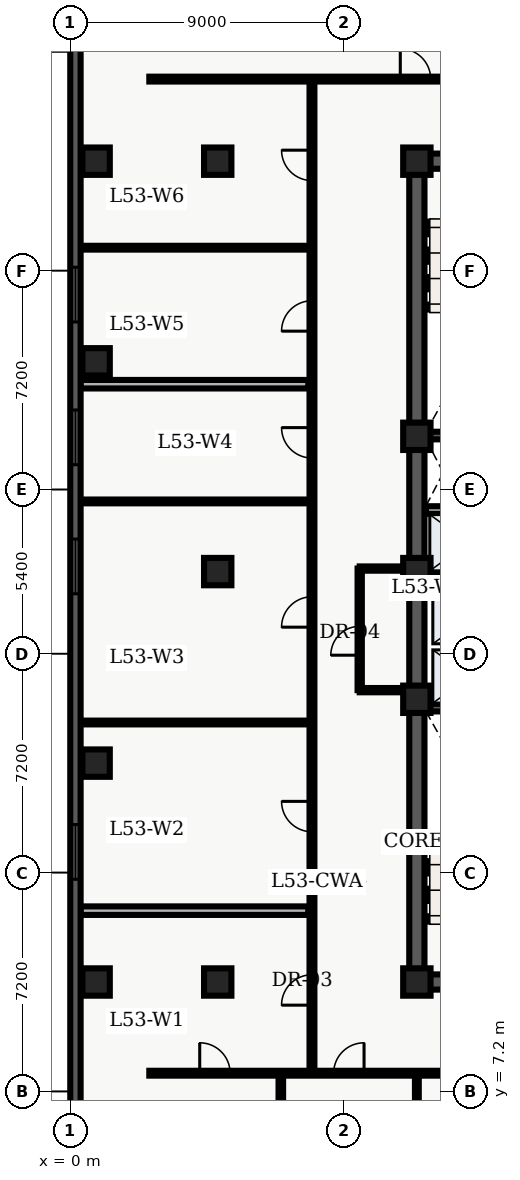
"""IFC4 building model, lengths in metres.
Left out: names, types, materials, properties, quantities, classifications, styles, units other than length and angle.
Written with IfcOpenShell. Run it as: python <this file> out.ifc"""

import sys

from ifc_helpers import new_model, entity, si_unit, converted_unit, direction, frame, origin_with_axes, origin_2d_with_axis, place, context, subcontext, project, spatial, polyline, rectangle, outline, extrude, element, fill, save


model = new_model("IFC4")
c1 = context("Model", 3, precision=1e-05, world=origin_with_axes(), true_north=direction((0.0, 1.0)))
c2 = subcontext(c1, "Body", "Model", "MODEL_VIEW")
j1 = project(units=[si_unit("LENGTHUNIT", "METRE"), converted_unit("PLANEANGLEUNIT", "DEGREE", entity("IfcPlaneAngleMeasure", 0.017), si_unit("PLANEANGLEUNIT", "RADIAN"), dimensions=[0, 0, 0, 0, 0, 0, 0])], contexts=[c1])
p1 = place(None, origin_with_axes())
s1 = spatial("IfcSite", under=j1, at=p1, CompositionType="ELEMENT")
p2 = place(p1, origin_with_axes())
s2 = spatial("IfcBuilding", under=s1, at=p2, CompositionType="ELEMENT")
p3 = place(p2, frame((0.0, 0.0, 216.0), z_axis=(0.0, 0.0, 1.0), x_axis=(1.0, 0.0, 0.0)))
s3 = spatial("IfcBuildingStorey", under=s2, at=p3, CompositionType="ELEMENT", Elevation=216.0)
p4 = place(p3, frame((11.4, 10.8, 0.0), z_axis=(0.0, 0.0, 1.0), x_axis=(0.0, 1.0, 0.0)))
e1 = element("IfcWall", 1, at=p4, inside=s3, PredefinedType="SHEAR", context=c2, shape_type="SweptSolid", body=[
    extrude(outline(polyline([(0.0, -0.25), (27.0, -0.25), (27.0, 0.25), (0.0, 0.25), (0.0, -0.25)])), origin_with_axes(), (0.0, 0.0, 1.0), 3.6),
])
p5 = place(p3, frame((11.4, 10.8, 0.0), z_axis=(0.0, 0.0, 1.0), x_axis=(1.0, 0.0, 0.0)))
e2 = element("IfcWall", 2, at=p5, inside=s3, PredefinedType="SHEAR", context=c2, shape_type="SweptSolid", body=[
    extrude(outline(polyline([(0.0, -0.25), (7.2, -0.25), (7.2, 0.25), (0.0, 0.25), (0.0, -0.25)])), origin_with_axes(), (0.0, 0.0, 1.0), 3.6),
])
p6 = place(p5, frame((2.625, 0.0, 0.0), z_axis=(0.0, 0.0, 1.0), x_axis=(1.0, 0.0, 0.0)))
e3 = element("IfcOpeningElement", 3, at=p6, cuts=e2, PredefinedType="OPENING", context=c2, shape_type="SweptSolid", body=[
    extrude(rectangle(XDim=1.05, YDim=0.52, at=origin_2d_with_axis()), origin_with_axes(), (0.0, 0.0, 1.0), 2.15),
])
p7 = place(p3, frame((11.4, 37.8, 0.0), z_axis=(0.0, 0.0, 1.0), x_axis=(1.0, 0.0, 0.0)))
e4 = element("IfcWall", 4, at=p7, inside=s3, PredefinedType="SHEAR", context=c2, shape_type="SweptSolid", body=[
    extrude(outline(polyline([(0.0, -0.25), (7.2, -0.25), (7.2, 0.25), (0.0, 0.25), (0.0, -0.25)])), origin_with_axes(), (0.0, 0.0, 1.0), 3.6),
])
p8 = place(p7, frame((2.625, 0.0, 0.0), z_axis=(0.0, 0.0, 1.0), x_axis=(1.0, 0.0, 0.0)))
e5 = element("IfcOpeningElement", 5, at=p8, cuts=e4, PredefinedType="OPENING", context=c2, shape_type="SweptSolid", body=[
    extrude(rectangle(XDim=1.05, YDim=0.52, at=origin_2d_with_axis()), origin_with_axes(), (0.0, 0.0, 1.0), 2.15),
])
for number, where, z_axis, x_axis in (
    (6, (11.65, 19.825, 0.0), (0.0, 0.0, 1.0), (1.0, 0.0, 0.0)),
    (7, (11.65, 28.775, 0.0), (0.0, 0.0, 1.0), (1.0, 0.0, 0.0)),
):
    element("IfcWall", number, at=place(p3, frame(where, z_axis=z_axis, x_axis=x_axis)), inside=s3, PredefinedType="SHEAR", context=c2, shape_type="SweptSolid", body=[
        extrude(outline(polyline([(0.0, -0.125), (6.7, -0.125), (6.7, 0.125), (0.0, 0.125), (0.0, -0.125)])), origin_with_axes(), (0.0, 0.0, 1.0), 3.6),
    ])
p9 = place(p3, frame((11.7, 24.1, 0.0), z_axis=(0.0, 0.0, 1.0), x_axis=(1.0, 0.0, 0.0)))
e8 = element("IfcWall", 8, at=p9, inside=s3, PredefinedType="SOLIDWALL", context=c2, shape_type="SweptSolid", body=[
    extrude(outline(polyline([(0.0, -0.125), (6.6, -0.125), (6.6, 0.125), (0.0, 0.125), (0.0, -0.125)])), origin_with_axes(), (0.0, 0.0, 1.0), 2.64),
])
p10 = place(p9, frame((3.75, 0.0, 0.0), z_axis=(0.0, 0.0, 1.0), x_axis=(1.0, 0.0, 0.0)))
e9 = element("IfcOpeningElement", 9, at=p10, cuts=e8, PredefinedType="OPENING", context=c2, shape_type="SweptSolid", body=[
    extrude(rectangle(XDim=0.9, YDim=0.27, at=origin_2d_with_axis()), origin_with_axes(), (0.0, 0.0, 1.0), 2.15),
])
p11 = place(p3, frame((11.7, 26.325, 0.0), z_axis=(0.0, 0.0, 1.0), x_axis=(1.0, 0.0, 0.0)))
e10 = element("IfcWall", 10, at=p11, inside=s3, PredefinedType="SOLIDWALL", context=c2, shape_type="SweptSolid", body=[
    extrude(outline(polyline([(0.0, -0.125), (6.6, -0.125), (6.6, 0.125), (0.0, 0.125), (0.0, -0.125)])), origin_with_axes(), (0.0, 0.0, 1.0), 2.64),
])
p12 = place(p11, frame((3.5, 0.0, 0.0), z_axis=(0.0, 0.0, 1.0), x_axis=(1.0, 0.0, 0.0)))
e11 = element("IfcOpeningElement", 11, at=p12, cuts=e10, PredefinedType="OPENING", context=c2, shape_type="SweptSolid", body=[
    extrude(rectangle(XDim=0.9, YDim=0.27, at=origin_2d_with_axis()), origin_with_axes(), (0.0, 0.0, 1.0), 2.15),
])
for number, where, z_axis, x_axis in (
    (12, (11.4, 10.8, 0.0), (0.0, 0.0, 1.0), (1.0, 0.0, 0.0)),
    (13, (11.4, 20.1, 0.0), (0.0, 0.0, 1.0), (1.0, 0.0, 0.0)),
    (14, (11.4, 24.3, 0.0), (0.0, 0.0, 1.0), (1.0, 0.0, 0.0)),
    (15, (11.4, 28.75, 0.0), (0.0, 0.0, 1.0), (1.0, 0.0, 0.0)),
    (16, (11.4, 37.8, 0.0), (0.0, 0.0, 1.0), (1.0, 0.0, 0.0)),
    (17, (4.85, 10.8, 0.0), (0.0, 0.0, 1.0), (1.0, 0.0, 0.0)),
    (18, (4.85, 24.3, 0.0), (0.0, 0.0, 1.0), (1.0, 0.0, 0.0)),
    (19, (4.85, 37.8, 0.0), (0.0, 0.0, 1.0), (1.0, 0.0, 0.0)),
    (20, (0.85, 10.8, 0.0), (0.0, 0.0, 1.0), (1.0, 0.0, 0.0)),
    (21, (0.85, 18.0, 0.0), (0.0, 0.0, 1.0), (1.0, 0.0, 0.0)),
    (22, (0.85, 31.2, 0.0), (0.0, 0.0, 1.0), (1.0, 0.0, 0.0)),
    (23, (0.85, 37.8, 0.0), (0.0, 0.0, 1.0), (1.0, 0.0, 0.0)),
):
    element("IfcColumn", number, at=place(p3, frame(where, z_axis=z_axis, x_axis=x_axis)), inside=s3, PredefinedType="COLUMN", context=c2, shape_type="SweptSolid", body=[
        extrude(rectangle(XDim=0.9, YDim=0.9, at=origin_2d_with_axis()), origin_with_axes(), (0.0, 0.0, 1.0), 3.9),
    ])
p13 = place(p3, frame((9.52, 20.4, 0.0), z_axis=(0.0, 0.0, 1.0), x_axis=(0.0, 1.0, 0.0)))
e24 = element("IfcWall", 24, at=p13, inside=s3, PredefinedType="PARTITIONING", context=c2, shape_type="SweptSolid", body=[
    extrude(outline(polyline([(0.0, -0.07), (4.0, -0.07), (4.0, 0.07), (0.0, 0.07), (0.0, -0.07)])), origin_with_axes(), (0.0, 0.0, 1.0), 2.64),
])
p14 = place(p13, frame((1.625, 0.0, 0.0), z_axis=(0.0, 0.0, 1.0), x_axis=(1.0, 0.0, 0.0)))
e25 = element("IfcOpeningElement", 25, at=p14, cuts=e24, PredefinedType="OPENING", context=c2, shape_type="SweptSolid", body=[
    extrude(rectangle(XDim=0.95, YDim=0.16, at=origin_2d_with_axis()), origin_with_axes(), (0.0, 0.0, 1.0), 2.15),
])
for number, where, z_axis, x_axis in (
    (26, (9.52, 20.4, 0.0), (0.0, 0.0, 1.0), (1.0, 0.0, 0.0)),
    (27, (9.52, 24.4, 0.0), (0.0, 0.0, 1.0), (1.0, 0.0, 0.0)),
):
    element("IfcWall", number, at=place(p3, frame(where, z_axis=z_axis, x_axis=x_axis)), inside=s3, PredefinedType="PARTITIONING", context=c2, shape_type="SweptSolid", body=[
        extrude(outline(polyline([(0.0, -0.07), (1.58, -0.07), (1.58, 0.07), (0.0, 0.07), (0.0, -0.07)])), origin_with_axes(), (0.0, 0.0, 1.0), 2.64),
    ])
p15 = place(p3, frame((2.6, 7.8, 0.0), z_axis=(0.0, 0.0, 1.0), x_axis=(1.0, 0.0, 0.0)))
e28 = element("IfcWall", 28, at=p15, inside=s3, PredefinedType="PARTITIONING", context=c2, shape_type="SweptSolid", body=[
    extrude(outline(polyline([(0.0, -0.08), (18.55, -0.08), (18.55, 0.08), (0.0, 0.08), (0.0, -0.08)])), origin_with_axes(), (0.0, 0.0, 1.0), 2.64),
])
p16 = place(p15, frame((2.158, 0.0, 0.0), z_axis=(0.0, 0.0, 1.0), x_axis=(1.0, 0.0, 0.0)))
e29 = element("IfcOpeningElement", 29, at=p16, cuts=e28, PredefinedType="OPENING", context=c2, shape_type="SweptSolid", body=[
    extrude(rectangle(XDim=1.0, YDim=0.18, at=origin_2d_with_axis()), origin_with_axes(), (0.0, 0.0, 1.0), 2.15),
])
p17 = place(p15, frame((6.563, 0.0, 0.0), z_axis=(0.0, 0.0, 1.0), x_axis=(1.0, 0.0, 0.0)))
e30 = element("IfcOpeningElement", 30, at=p17, cuts=e28, PredefinedType="OPENING", context=c2, shape_type="SweptSolid", body=[
    extrude(rectangle(XDim=1.0, YDim=0.18, at=origin_2d_with_axis()), origin_with_axes(), (0.0, 0.0, 1.0), 2.15),
])
p18 = place(p15, frame((11.931, 0.0, 0.0), z_axis=(0.0, 0.0, 1.0), x_axis=(1.0, 0.0, 0.0)))
e31 = element("IfcOpeningElement", 31, at=p18, cuts=e28, PredefinedType="OPENING", context=c2, shape_type="SweptSolid", body=[
    extrude(rectangle(XDim=1.0, YDim=0.18, at=origin_2d_with_axis()), origin_with_axes(), (0.0, 0.0, 1.0), 2.15),
])
p19 = place(p15, frame((16.501, 0.0, 0.0), z_axis=(0.0, 0.0, 1.0), x_axis=(1.0, 0.0, 0.0)))
e32 = element("IfcOpeningElement", 32, at=p19, cuts=e28, PredefinedType="OPENING", context=c2, shape_type="SweptSolid", body=[
    extrude(rectangle(XDim=1.0, YDim=0.18, at=origin_2d_with_axis()), origin_with_axes(), (0.0, 0.0, 1.0), 2.15),
])
p20 = place(p3, frame((2.6, 40.5, 0.0), z_axis=(0.0, 0.0, 1.0), x_axis=(1.0, 0.0, 0.0)))
e33 = element("IfcWall", 33, at=p20, inside=s3, PredefinedType="PARTITIONING", context=c2, shape_type="SweptSolid", body=[
    extrude(outline(polyline([(0.0, -0.08), (29.465, -0.08), (29.465, 0.08), (0.0, 0.08), (0.0, -0.08)])), origin_with_axes(), (0.0, 0.0, 1.0), 2.64),
])
p21 = place(p20, frame((8.755, 0.0, 0.0), z_axis=(0.0, 0.0, 1.0), x_axis=(1.0, 0.0, 0.0)))
e34 = element("IfcOpeningElement", 34, at=p21, cuts=e33, PredefinedType="OPENING", context=c2, shape_type="SweptSolid", body=[
    extrude(rectangle(XDim=1.0, YDim=0.18, at=origin_2d_with_axis()), origin_with_axes(), (0.0, 0.0, 1.0), 2.15),
])
p22 = place(p3, frame((7.95, 7.8, 0.0), z_axis=(0.0, 0.0, 1.0), x_axis=(0.0, 1.0, 0.0)))
e35 = element("IfcWall", 35, at=p22, inside=s3, PredefinedType="PARTITIONING", context=c2, shape_type="SweptSolid", body=[
    extrude(outline(polyline([(0.0, -0.08), (32.7, -0.08), (32.7, 0.08), (0.0, 0.08), (0.0, -0.08)])), origin_with_axes(), (0.0, 0.0, 1.0), 2.64),
])
p23 = place(p22, frame((2.739, 0.0, 0.0), z_axis=(0.0, 0.0, 1.0), x_axis=(1.0, 0.0, 0.0)))
e36 = element("IfcOpeningElement", 36, at=p23, cuts=e35, PredefinedType="OPENING", context=c2, shape_type="SweptSolid", body=[
    extrude(rectangle(XDim=1.0, YDim=0.18, at=origin_2d_with_axis()), origin_with_axes(), (0.0, 0.0, 1.0), 2.15),
])
p24 = place(p22, frame((8.441, 0.0, 0.0), z_axis=(0.0, 0.0, 1.0), x_axis=(1.0, 0.0, 0.0)))
e37 = element("IfcOpeningElement", 37, at=p24, cuts=e35, PredefinedType="OPENING", context=c2, shape_type="SweptSolid", body=[
    extrude(rectangle(XDim=1.0, YDim=0.18, at=origin_2d_with_axis()), origin_with_axes(), (0.0, 0.0, 1.0), 2.15),
])
p25 = place(p22, frame((15.172, 0.0, 0.0), z_axis=(0.0, 0.0, 1.0), x_axis=(1.0, 0.0, 0.0)))
e38 = element("IfcOpeningElement", 38, at=p25, cuts=e35, PredefinedType="OPENING", context=c2, shape_type="SweptSolid", body=[
    extrude(rectangle(XDim=1.0, YDim=0.18, at=origin_2d_with_axis()), origin_with_axes(), (0.0, 0.0, 1.0), 2.15),
])
p26 = place(p22, frame((20.736, 0.0, 0.0), z_axis=(0.0, 0.0, 1.0), x_axis=(1.0, 0.0, 0.0)))
e39 = element("IfcOpeningElement", 39, at=p26, cuts=e35, PredefinedType="OPENING", context=c2, shape_type="SweptSolid", body=[
    extrude(rectangle(XDim=1.0, YDim=0.18, at=origin_2d_with_axis()), origin_with_axes(), (0.0, 0.0, 1.0), 2.15),
])
p27 = place(p22, frame((24.909, 0.0, 0.0), z_axis=(0.0, 0.0, 1.0), x_axis=(1.0, 0.0, 0.0)))
e40 = element("IfcOpeningElement", 40, at=p27, cuts=e35, PredefinedType="OPENING", context=c2, shape_type="SweptSolid", body=[
    extrude(rectangle(XDim=1.0, YDim=0.18, at=origin_2d_with_axis()), origin_with_axes(), (0.0, 0.0, 1.0), 2.15),
])
p28 = place(p22, frame((29.862, 0.0, 0.0), z_axis=(0.0, 0.0, 1.0), x_axis=(1.0, 0.0, 0.0)))
e41 = element("IfcOpeningElement", 41, at=p28, cuts=e35, PredefinedType="OPENING", context=c2, shape_type="SweptSolid", body=[
    extrude(rectangle(XDim=1.0, YDim=0.18, at=origin_2d_with_axis()), origin_with_axes(), (0.0, 0.0, 1.0), 2.15),
])
p29 = place(p3, frame((0.335, 13.147, 0.0), z_axis=(0.0, 0.0, 1.0), x_axis=(1.0, 0.0, 0.0)))
e42 = element("IfcWall", 42, at=p29, inside=s3, PredefinedType="PARTITIONING", context=c2, shape_type="SweptSolid", body=[
    extrude(outline(polyline([(0.0, -0.14), (7.495, -0.14), (7.495, 0.14), (0.0, 0.14), (0.0, -0.14)])), origin_with_axes(), (0.0, 0.0, 1.0), 2.64),
])
for number, where, z_axis, x_axis in (
    (43, (0.335, 19.336, 0.0), (0.0, 0.0, 1.0), (1.0, 0.0, 0.0)),
    (44, (0.335, 26.608, 0.0), (0.0, 0.0, 1.0), (1.0, 0.0, 0.0)),
):
    element("IfcWall", number, at=place(p3, frame(where, z_axis=z_axis, x_axis=x_axis)), inside=s3, PredefinedType="PARTITIONING", context=c2, shape_type="SweptSolid", body=[
        extrude(outline(polyline([(0.0, -0.062), (7.495, -0.062), (7.495, 0.062), (0.0, 0.062), (0.0, -0.062)])), origin_with_axes(), (0.0, 0.0, 1.0), 2.64),
    ])
p30 = place(p3, frame((0.335, 30.464, 0.0), z_axis=(0.0, 0.0, 1.0), x_axis=(1.0, 0.0, 0.0)))
e45 = element("IfcWall", 45, at=p30, inside=s3, PredefinedType="PARTITIONING", context=c2, shape_type="SweptSolid", body=[
    extrude(outline(polyline([(0.0, -0.14), (7.495, -0.14), (7.495, 0.14), (0.0, 0.14), (0.0, -0.14)])), origin_with_axes(), (0.0, 0.0, 1.0), 2.64),
])
p31 = place(p3, frame((0.335, 34.954, 0.0), z_axis=(0.0, 0.0, 1.0), x_axis=(1.0, 0.0, 0.0)))
e46 = element("IfcWall", 46, at=p31, inside=s3, PredefinedType="PARTITIONING", context=c2, shape_type="SweptSolid", body=[
    extrude(outline(polyline([(0.0, -0.062), (7.495, -0.062), (7.495, 0.062), (0.0, 0.062), (0.0, -0.062)])), origin_with_axes(), (0.0, 0.0, 1.0), 2.64),
])
p32 = place(p3, frame((6.926, 0.335, 0.0), z_axis=(0.0, 0.0, 1.0), x_axis=(0.0, 1.0, 0.0)))
e47 = element("IfcWall", 47, at=p32, inside=s3, PredefinedType="PARTITIONING", context=c2, shape_type="SweptSolid", body=[
    extrude(outline(polyline([(0.0, -0.075), (7.365, -0.075), (7.365, 0.075), (0.0, 0.075), (0.0, -0.075)])), origin_with_axes(), (0.0, 0.0, 1.0), 2.64),
])
p33 = place(p3, frame((11.4, 0.335, 0.0), z_axis=(0.0, 0.0, 1.0), x_axis=(0.0, 1.0, 0.0)))
e48 = element("IfcWall", 48, at=p33, inside=s3, PredefinedType="PARTITIONING", context=c2, shape_type="SweptSolid", body=[
    extrude(outline(polyline([(0.0, -0.062), (7.365, -0.062), (7.365, 0.062), (0.0, 0.062), (0.0, -0.062)])), origin_with_axes(), (0.0, 0.0, 1.0), 2.64),
])
p34 = place(p3, frame((0.17, 2.74, 0.0), z_axis=(0.0, 0.0, 1.0), x_axis=(0.0, 1.0, 0.0)))
e49 = element("IfcWall", 49, at=p34, inside=s3, PredefinedType="SOLIDWALL", context=c2, shape_type="SweptSolid", body=[
    extrude(outline(polyline([(0.0, -0.17), (43.46, -0.17), (43.46, 0.17), (0.0, 0.17), (0.0, -0.17)])), origin_with_axes(), (0.0, 0.0, 1.0), 3.6),
])
p35 = place(p34, frame((2.948, 0.0, 0.45), z_axis=(0.0, 0.0, 1.0), x_axis=(1.0, 0.0, 0.0)))
e50 = element("IfcOpeningElement", 50, at=p35, cuts=e49, PredefinedType="OPENING", context=c2, shape_type="SweptSolid", body=[
    extrude(rectangle(XDim=1.8, YDim=0.36, at=origin_2d_with_axis()), origin_with_axes(), (0.0, 0.0, 1.0), 2.1),
])
p36 = place(p34, frame((12.339, 0.0, 0.45), z_axis=(0.0, 0.0, 1.0), x_axis=(1.0, 0.0, 0.0)))
e51 = element("IfcOpeningElement", 51, at=p36, cuts=e49, PredefinedType="OPENING", context=c2, shape_type="SweptSolid", body=[
    extrude(rectangle(XDim=1.8, YDim=0.36, at=origin_2d_with_axis()), origin_with_axes(), (0.0, 0.0, 1.0), 2.1),
])
p37 = place(p34, frame((21.73, 0.0, 0.45), z_axis=(0.0, 0.0, 1.0), x_axis=(1.0, 0.0, 0.0)))
e52 = element("IfcOpeningElement", 52, at=p37, cuts=e49, PredefinedType="OPENING", context=c2, shape_type="SweptSolid", body=[
    extrude(rectangle(XDim=1.8, YDim=0.36, at=origin_2d_with_axis()), origin_with_axes(), (0.0, 0.0, 1.0), 2.1),
])
p38 = place(p34, frame((25.976, 0.0, 0.45), z_axis=(0.0, 0.0, 1.0), x_axis=(1.0, 0.0, 0.0)))
e53 = element("IfcOpeningElement", 53, at=p38, cuts=e49, PredefinedType="OPENING", context=c2, shape_type="SweptSolid", body=[
    extrude(rectangle(XDim=1.8, YDim=0.36, at=origin_2d_with_axis()), origin_with_axes(), (0.0, 0.0, 1.0), 2.1),
])
p39 = place(p34, frame((30.671, 0.0, 0.45), z_axis=(0.0, 0.0, 1.0), x_axis=(1.0, 0.0, 0.0)))
e54 = element("IfcOpeningElement", 54, at=p39, cuts=e49, PredefinedType="OPENING", context=c2, shape_type="SweptSolid", body=[
    extrude(rectangle(XDim=1.8, YDim=0.36, at=origin_2d_with_axis()), origin_with_axes(), (0.0, 0.0, 1.0), 2.1),
])
p40 = place(p34, frame((40.062, 0.0, 0.45), z_axis=(0.0, 0.0, 1.0), x_axis=(1.0, 0.0, 0.0)))
e55 = element("IfcOpeningElement", 55, at=p40, cuts=e49, PredefinedType="OPENING", context=c2, shape_type="SweptSolid", body=[
    extrude(rectangle(XDim=1.8, YDim=0.36, at=origin_2d_with_axis()), origin_with_axes(), (0.0, 0.0, 1.0), 2.1),
])
p41 = place(p13, frame((1.625, 0.0, 0.0), z_axis=(0.0, 0.0, 1.0), x_axis=(1.0, 0.0, 0.0)))
e56 = element("IfcDoor", 56, at=p41, inside=s3, OperationType="SINGLE_SWING_LEFT", PredefinedType="DOOR", context=c2, shape_type="SweptSolid", body=[
    extrude(rectangle(XDim=0.95, YDim=0.084, at=origin_2d_with_axis()), origin_with_axes(), (0.0, 0.0, 1.0), 2.15),
])
fill(e25, e56)
p42 = place(p22, frame((2.739, 0.0, 0.0), z_axis=(0.0, 0.0, 1.0), x_axis=(1.0, 0.0, 0.0)))
e57 = element("IfcDoor", 57, at=p42, inside=s3, OperationType="SINGLE_SWING_LEFT", PredefinedType="DOOR", context=c2, shape_type="SweptSolid", body=[
    extrude(rectangle(XDim=1.0, YDim=0.09, at=origin_2d_with_axis()), origin_with_axes(), (0.0, 0.0, 1.0), 2.15),
])
fill(e36, e57)
p43 = place(p22, frame((8.441, 0.0, 0.0), z_axis=(0.0, 0.0, 1.0), x_axis=(1.0, 0.0, 0.0)))
e58 = element("IfcDoor", 58, at=p43, inside=s3, OperationType="SINGLE_SWING_RIGHT", PredefinedType="DOOR", context=c2, shape_type="SweptSolid", body=[
    extrude(rectangle(XDim=1.0, YDim=0.09, at=origin_2d_with_axis()), origin_with_axes(), (0.0, 0.0, 1.0), 2.15),
])
fill(e37, e58)
p44 = place(p22, frame((15.172, 0.0, 0.0), z_axis=(0.0, 0.0, 1.0), x_axis=(1.0, 0.0, 0.0)))
e59 = element("IfcDoor", 59, at=p44, inside=s3, OperationType="SINGLE_SWING_LEFT", PredefinedType="DOOR", context=c2, shape_type="SweptSolid", body=[
    extrude(rectangle(XDim=1.0, YDim=0.09, at=origin_2d_with_axis()), origin_with_axes(), (0.0, 0.0, 1.0), 2.15),
])
fill(e38, e59)
p45 = place(p22, frame((20.736, 0.0, 0.0), z_axis=(0.0, 0.0, 1.0), x_axis=(1.0, 0.0, 0.0)))
e60 = element("IfcDoor", 60, at=p45, inside=s3, OperationType="SINGLE_SWING_RIGHT", PredefinedType="DOOR", context=c2, shape_type="SweptSolid", body=[
    extrude(rectangle(XDim=1.0, YDim=0.09, at=origin_2d_with_axis()), origin_with_axes(), (0.0, 0.0, 1.0), 2.15),
])
fill(e39, e60)
p46 = place(p22, frame((24.909, 0.0, 0.0), z_axis=(0.0, 0.0, 1.0), x_axis=(1.0, 0.0, 0.0)))
e61 = element("IfcDoor", 61, at=p46, inside=s3, OperationType="SINGLE_SWING_LEFT", PredefinedType="DOOR", context=c2, shape_type="SweptSolid", body=[
    extrude(rectangle(XDim=1.0, YDim=0.09, at=origin_2d_with_axis()), origin_with_axes(), (0.0, 0.0, 1.0), 2.15),
])
fill(e40, e61)
p47 = place(p22, frame((29.862, 0.0, 0.0), z_axis=(0.0, 0.0, 1.0), x_axis=(1.0, 0.0, 0.0)))
e62 = element("IfcDoor", 62, at=p47, inside=s3, OperationType="SINGLE_SWING_RIGHT", PredefinedType="DOOR", context=c2, shape_type="SweptSolid", body=[
    extrude(rectangle(XDim=1.0, YDim=0.09, at=origin_2d_with_axis()), origin_with_axes(), (0.0, 0.0, 1.0), 2.15),
])
fill(e41, e62)
p48 = place(p15, frame((2.158, 0.0, 0.0), z_axis=(0.0, 0.0, 1.0), x_axis=(1.0, 0.0, 0.0)))
e63 = element("IfcDoor", 63, at=p48, inside=s3, OperationType="SINGLE_SWING_LEFT", PredefinedType="DOOR", context=c2, shape_type="SweptSolid", body=[
    extrude(rectangle(XDim=1.0, YDim=0.09, at=origin_2d_with_axis()), origin_with_axes(), (0.0, 0.0, 1.0), 2.15),
])
fill(e29, e63)
p49 = place(p15, frame((6.563, 0.0, 0.0), z_axis=(0.0, 0.0, 1.0), x_axis=(1.0, 0.0, 0.0)))
e64 = element("IfcDoor", 64, at=p49, inside=s3, OperationType="SINGLE_SWING_RIGHT", PredefinedType="DOOR", context=c2, shape_type="SweptSolid", body=[
    extrude(rectangle(XDim=1.0, YDim=0.09, at=origin_2d_with_axis()), origin_with_axes(), (0.0, 0.0, 1.0), 2.15),
])
fill(e30, e64)
p50 = place(p20, frame((8.755, 0.0, 0.0), z_axis=(0.0, 0.0, 1.0), x_axis=(1.0, 0.0, 0.0)))
e65 = element("IfcDoor", 65, at=p50, inside=s3, OperationType="SINGLE_SWING_LEFT", PredefinedType="DOOR", context=c2, shape_type="SweptSolid", body=[
    extrude(rectangle(XDim=1.0, YDim=0.09, at=origin_2d_with_axis()), origin_with_axes(), (0.0, 0.0, 1.0), 2.15),
])
fill(e34, e65)
p51 = place(p34, frame((12.339, 0.0, 0.45), z_axis=(0.0, 0.0, 1.0), x_axis=(1.0, 0.0, 0.0)))
e66 = element("IfcWindow", 66, at=p51, inside=s3, PredefinedType="WINDOW", context=c2, shape_type="SweptSolid", body=[
    extrude(rectangle(XDim=1.8, YDim=0.09, at=origin_2d_with_axis()), origin_with_axes(), (0.0, 0.0, 1.0), 2.1),
])
fill(e51, e66)
p52 = place(p34, frame((21.73, 0.0, 0.45), z_axis=(0.0, 0.0, 1.0), x_axis=(1.0, 0.0, 0.0)))
e67 = element("IfcWindow", 67, at=p52, inside=s3, PredefinedType="WINDOW", context=c2, shape_type="SweptSolid", body=[
    extrude(rectangle(XDim=1.8, YDim=0.09, at=origin_2d_with_axis()), origin_with_axes(), (0.0, 0.0, 1.0), 2.1),
])
fill(e52, e67)
p53 = place(p34, frame((25.976, 0.0, 0.45), z_axis=(0.0, 0.0, 1.0), x_axis=(1.0, 0.0, 0.0)))
e68 = element("IfcWindow", 68, at=p53, inside=s3, PredefinedType="WINDOW", context=c2, shape_type="SweptSolid", body=[
    extrude(rectangle(XDim=1.8, YDim=0.09, at=origin_2d_with_axis()), origin_with_axes(), (0.0, 0.0, 1.0), 2.1),
])
fill(e53, e68)
p54 = place(p34, frame((30.671, 0.0, 0.45), z_axis=(0.0, 0.0, 1.0), x_axis=(1.0, 0.0, 0.0)))
e69 = element("IfcWindow", 69, at=p54, inside=s3, PredefinedType="WINDOW", context=c2, shape_type="SweptSolid", body=[
    extrude(rectangle(XDim=1.8, YDim=0.09, at=origin_2d_with_axis()), origin_with_axes(), (0.0, 0.0, 1.0), 2.1),
])
fill(e54, e69)
save(model, sys.argv[1])
